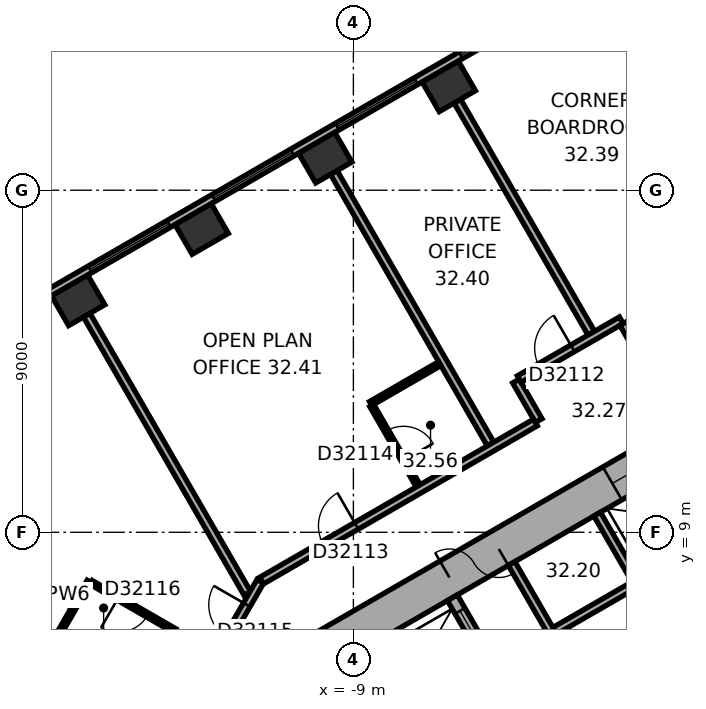
"""IFC4 building model, lengths in metres.
Left out: names, types, materials, properties, quantities, classifications, styles, units other than length and angle.
Written with IfcOpenShell. Run it as: python <this file> out.ifc"""

import sys

from ifc_helpers import new_model, si_unit, direction, frame, frame_2d, origin, origin_2d, place, context, subcontext, project, spatial, rectangle, extrude, element, fill, save


model = new_model("IFC4")
c1 = context("Model", 3, precision=1e-05, world=origin(), true_north=direction((0.0, 1.0)))
c2 = subcontext(c1, "Body", "Model", "MODEL_VIEW")
j1 = project(units=[si_unit("LENGTHUNIT", "METRE"), si_unit("PLANEANGLEUNIT", "RADIAN")], contexts=[c1])
p1 = place(None, origin())
s1 = spatial("IfcSite", under=j1, at=p1, CompositionType="ELEMENT")
p2 = place(p1, origin())
s2 = spatial("IfcBuilding", under=s1, at=p2, CompositionType="ELEMENT")
p3 = place(p2, frame((0.0, 0.0, 131.8)))
s3 = spatial("IfcBuildingStorey", under=s2, at=p3, CompositionType="ELEMENT", Elevation=131.8)
for number, where, z_axis, x_axis in (
    (1, (-6.489, 20.733, 0.0), (0.0, 0.0, 1.0), (-0.866, -0.5, 0.0)),
    (2, (-9.74, 18.856, 0.0), (0.0, 0.0, 1.0), (-0.866, -0.5, 0.0)),
    (3, (-12.991, 16.979, 0.0), (0.0, 0.0, 1.0), (-0.866, -0.5, 0.0)),
    (4, (-16.242, 15.102, 0.0), (0.0, 0.0, 1.0), (-0.866, -0.5, 0.0)),
):
    element("IfcColumn", number, at=place(p3, frame(where, z_axis=z_axis, x_axis=x_axis)), inside=s3, PredefinedType="COLUMN", context=c2, shape_type="SweptSolid", body=[
        extrude(rectangle(XDim=1.1, YDim=0.9, at=origin_2d()), origin(), (0.0, 0.0, 1.0), 3.7),
    ])
p4 = place(p3, frame((0.25, 11.691, 0.0), z_axis=(0.0, 0.0, 1.0), x_axis=(-0.866022616891, -0.50000482701, 0.0)))
e5 = element("IfcWall", 5, at=p4, inside=s3, PredefinedType="SHEAR", context=c2, shape_type="SweptSolid", body=[
    extrude(rectangle(XDim=12.125, YDim=1.0, at=frame_2d((6.062, 0.0))), origin(), (0.0, 0.0, 1.0), 3.7),
])
p5 = place(p4, frame((6.262, 0.0, 0.0)))
e6 = element("IfcOpeningElement", 6, at=p5, cuts=e5, PredefinedType="OPENING", context=c2, shape_type="SweptSolid", body=[
    extrude(rectangle(XDim=1.5, YDim=2.1, at=frame_2d((0.75, 1.05))), frame((0.0, 0.51, 0.0), z_axis=(0.0, -1.0, 0.0), x_axis=(1.0, 0.0, 0.0)), (0.0, 0.0, 1.0), 1.02),
])
p6 = place(p4, frame((1.712, 0.0, 0.0)))
e7 = element("IfcOpeningElement", 7, at=p6, cuts=e5, PredefinedType="OPENING", context=c2, shape_type="SweptSolid", body=[
    extrude(rectangle(XDim=1.1, YDim=2.1, at=frame_2d((0.55, 1.05))), frame((0.0, 0.51, 0.0), z_axis=(0.0, -1.0, 0.0), x_axis=(1.0, 0.0, 0.0)), (0.0, 0.0, 1.0), 1.02),
])
p7 = place(p3, frame((-2.961, 23.405, 0.0), z_axis=(0.0, 0.0, 1.0), x_axis=(-0.866023315909, -0.500003616288, 0.0)))
e8 = element("IfcWall", 8, at=p7, inside=s3, PredefinedType="STANDARD", context=c2, shape_type="SweptSolid", body=[
    extrude(rectangle(XDim=20.044, YDim=0.2, at=frame_2d((10.022, 0.0))), origin(), (0.0, 0.0, 1.0), 3.7),
])
p8 = place(p7, frame((1.314, 0.0, 0.9)))
e9 = element("IfcOpeningElement", 9, at=p8, cuts=e8, PredefinedType="OPENING", context=c2, shape_type="SweptSolid", body=[
    extrude(rectangle(XDim=2.4, YDim=2.0, at=frame_2d((1.2, 1.0))), frame((0.0, 0.11, 0.0), z_axis=(0.0, -1.0, 0.0), x_axis=(1.0, 0.0, 0.0)), (0.0, 0.0, 1.0), 0.22),
])
p9 = place(p7, frame((5.069, 0.0, 0.9)))
e10 = element("IfcOpeningElement", 10, at=p9, cuts=e8, PredefinedType="OPENING", context=c2, shape_type="SweptSolid", body=[
    extrude(rectangle(XDim=2.4, YDim=2.0, at=frame_2d((1.2, 1.0))), frame((0.0, 0.11, 0.0), z_axis=(0.0, -1.0, 0.0), x_axis=(1.0, 0.0, 0.0)), (0.0, 0.0, 1.0), 0.22),
])
p10 = place(p7, frame((8.823, 0.0, 0.9)))
e11 = element("IfcOpeningElement", 11, at=p10, cuts=e8, PredefinedType="OPENING", context=c2, shape_type="SweptSolid", body=[
    extrude(rectangle(XDim=2.4, YDim=2.0, at=frame_2d((1.2, 1.0))), frame((0.0, 0.11, 0.0), z_axis=(0.0, -1.0, 0.0), x_axis=(1.0, 0.0, 0.0)), (0.0, 0.0, 1.0), 0.22),
])
p11 = place(p7, frame((12.577, 0.0, 0.9)))
e12 = element("IfcOpeningElement", 12, at=p11, cuts=e8, PredefinedType="OPENING", context=c2, shape_type="SweptSolid", body=[
    extrude(rectangle(XDim=2.4, YDim=2.0, at=frame_2d((1.2, 1.0))), frame((0.0, 0.11, 0.0), z_axis=(0.0, -1.0, 0.0), x_axis=(1.0, 0.0, 0.0)), (0.0, 0.0, 1.0), 0.22),
])
p12 = place(p7, frame((16.331, 0.0, 0.9)))
e13 = element("IfcOpeningElement", 13, at=p12, cuts=e8, PredefinedType="OPENING", context=c2, shape_type="SweptSolid", body=[
    extrude(rectangle(XDim=2.4, YDim=2.0, at=frame_2d((1.2, 1.0))), frame((0.0, 0.11, 0.0), z_axis=(0.0, -1.0, 0.0), x_axis=(1.0, 0.0, 0.0)), (0.0, 0.0, 1.0), 0.22),
])
p13 = place(p3, frame((0.803, 9.009, 0.0), z_axis=(0.0, 0.0, 1.0), x_axis=(-0.866028230842, -0.499995103361, 0.0)))
e14 = element("IfcWall", 14, at=p13, inside=s3, PredefinedType="PARTITIONING", context=c2, shape_type="SweptSolid", body=[
    extrude(rectangle(XDim=5.4, YDim=0.2, at=frame_2d((2.7, 0.0))), origin(), (0.0, 0.0, 1.0), 3.42),
])
for number, where, z_axis, x_axis in (
    (15, (-1.485, 7.572, 0.0), (0.0, 0.0, 1.0), (-0.5, 0.866, 0.0)),
    (16, (-3.737, 6.272, 0.0), (0.0, 0.0, 1.0), (-0.5, 0.866, 0.0)),
):
    element("IfcWall", number, at=place(p3, frame(where, z_axis=z_axis, x_axis=x_axis)), inside=s3, PredefinedType="PARTITIONING", context=c2, shape_type="SweptSolid", body=[
        extrude(rectangle(XDim=2.2, YDim=0.2, at=frame_2d((1.1, 0.0))), origin(), (0.0, 0.0, 1.0), 3.42),
    ])
p14 = place(p3, frame((-2.216, 4.282, 0.0), z_axis=(0.0, 0.0, 1.0), x_axis=(0.499977259774, 0.866038532462, 0.0)))
e17 = element("IfcWall", 17, at=p14, inside=s3, PredefinedType="SHEAR", context=c2, shape_type="SweptSolid", body=[
    extrude(rectangle(XDim=4.7, YDim=0.3, at=frame_2d((2.35, 0.0))), origin(), (0.0, 0.0, 1.0), 3.42),
])
p15 = place(p3, frame((-5.295, 5.372, 0.0), z_axis=(0.0, 0.0, 1.0), x_axis=(-0.500077893725, 0.86598042715, 0.0)))
e18 = element("IfcWall", 18, at=p15, inside=s3, PredefinedType="SHEAR", context=c2, shape_type="SweptSolid", body=[
    extrude(rectangle(XDim=2.2, YDim=0.3, at=frame_2d((1.1, 0.0))), origin(), (0.0, 0.0, 1.0), 3.42),
])
p16 = place(p15, frame((0.7, 0.0, 0.0)))
e19 = element("IfcOpeningElement", 19, at=p16, cuts=e18, PredefinedType="OPENING", context=c2, shape_type="SweptSolid", body=[
    extrude(rectangle(XDim=1.1, YDim=2.1, at=frame_2d((0.55, 1.05))), frame((0.0, 0.16, 0.0), z_axis=(0.0, -1.0, 0.0), x_axis=(1.0, 0.0, 0.0)), (0.0, 0.0, 1.0), 0.32),
])
p17 = place(p3, frame((-17.052, 5.804, 0.0), z_axis=(0.0, 0.0, 1.0), x_axis=(0.50002983664, 0.866008176907, 0.0)))
e20 = element("IfcWall", 20, at=p17, inside=s3, PredefinedType="PARTITIONING", context=c2, shape_type="SweptSolid", body=[
    extrude(rectangle(XDim=2.2, YDim=0.12, at=frame_2d((1.1, 0.0))), origin(), (0.0, 0.0, 1.0), 3.42),
])
p18 = place(p3, frame((-16.018, 14.712, 0.0), z_axis=(0.0, 0.0, 1.0), x_axis=(0.500000843414, -0.866024916838, 0.0)))
e21 = element("IfcWall", 21, at=p18, inside=s3, PredefinedType="PARTITIONING", context=c2, shape_type="SweptSolid", body=[
    extrude(rectangle(XDim=8.452, YDim=0.2, at=frame_2d((4.226, 0.0))), origin(), (0.0, 0.0, 1.0), 3.42),
])
p19 = place(p3, frame((-15.9, 7.679, 0.0), z_axis=(0.0, 0.0, 1.0), x_axis=(0.866022320763, -0.500005339912, 0.0)))
e22 = element("IfcWall", 22, at=p19, inside=s3, PredefinedType="PARTITIONING", context=c2, shape_type="SweptSolid", body=[
    extrude(rectangle(XDim=2.54, YDim=0.12, at=frame_2d((1.27, 0.0))), origin(), (0.0, 0.0, 1.0), 3.42),
])
p20 = place(p19, frame((0.82, 0.0, 0.0)))
e23 = element("IfcOpeningElement", 23, at=p20, cuts=e22, PredefinedType="OPENING", context=c2, shape_type="SweptSolid", body=[
    extrude(rectangle(XDim=0.9, YDim=2.1, at=frame_2d((0.45, 1.05))), frame((0.0, 0.07, 0.0), z_axis=(0.0, -1.0, 0.0), x_axis=(1.0, 0.0, 0.0)), (0.0, 0.0, 1.0), 0.14),
])
p21 = place(p3, frame((-11.45, 7.708, 0.0), z_axis=(0.0, 0.0, 1.0), x_axis=(-0.500022797313, -0.86601224135, 0.0)))
e24 = element("IfcWall", 24, at=p21, inside=s3, PredefinedType="PARTITIONING", context=c2, shape_type="SweptSolid", body=[
    extrude(rectangle(XDim=1.9, YDim=0.2, at=frame_2d((0.95, 0.0))), origin(), (0.0, 0.0, 1.0), 3.42),
])
p22 = place(p21, frame((0.712, 0.0, 0.0)))
e25 = element("IfcOpeningElement", 25, at=p22, cuts=e24, PredefinedType="OPENING", context=c2, shape_type="SweptSolid", body=[
    extrude(rectangle(XDim=1.0, YDim=2.1, at=frame_2d((0.5, 1.05))), frame((0.0, 0.11, 0.0), z_axis=(0.0, -1.0, 0.0), x_axis=(1.0, 0.0, 0.0)), (0.0, 0.0, 1.0), 0.22),
])
p23 = place(p3, frame((-9.515, 18.466, 0.0), z_axis=(0.0, 0.0, 1.0), x_axis=(0.500009360108, -0.866019999656, 0.0)))
e26 = element("IfcWall", 26, at=p23, inside=s3, PredefinedType="PARTITIONING", context=c2, shape_type="SweptSolid", body=[
    extrude(rectangle(XDim=8.25, YDim=0.2, at=frame_2d((4.125, 0.0))), origin(), (0.0, 0.0, 1.0), 2.87),
])
p24 = place(p3, frame((-8.545, 12.387, 0.0), z_axis=(0.0, 0.0, 1.0), x_axis=(0.866009402589, 0.500027713859, 0.0)))
e27 = element("IfcWall", 27, at=p24, inside=s3, PredefinedType="PARTITIONING", context=c2, shape_type="SweptSolid", body=[
    extrude(rectangle(XDim=2.1, YDim=0.12, at=frame_2d((1.05, 0.0))), origin(), (0.0, 0.0, 1.0), 3.42),
])
p25 = place(p3, frame((-7.295, 10.222, 0.0), z_axis=(0.0, 0.0, 1.0), x_axis=(-0.500002508028, 0.866023955769, 0.0)))
e28 = element("IfcWall", 28, at=p25, inside=s3, PredefinedType="PARTITIONING", context=c2, shape_type="SweptSolid", body=[
    extrude(rectangle(XDim=2.44, YDim=0.12, at=frame_2d((1.22, 0.0))), origin(), (0.0, 0.0, 1.0), 3.42),
])
p26 = place(p25, frame((0.77, 0.0, 0.0)))
e29 = element("IfcOpeningElement", 29, at=p26, cuts=e28, PredefinedType="OPENING", context=c2, shape_type="SweptSolid", body=[
    extrude(rectangle(XDim=0.9, YDim=2.1, at=frame_2d((0.45, 1.05))), frame((0.0, 0.07, 0.0), z_axis=(0.0, -1.0, 0.0), x_axis=(1.0, 0.0, 0.0)), (0.0, 0.0, 1.0), 0.14),
])
p27 = place(p3, frame((-6.264, 20.344, 0.0), z_axis=(0.0, 0.0, 1.0), x_axis=(0.500009260695, -0.866020057054, 0.0)))
e30 = element("IfcWall", 30, at=p27, inside=s3, PredefinedType="PARTITIONING", context=c2, shape_type="SweptSolid", body=[
    extrude(rectangle(XDim=7.049, YDim=0.2, at=frame_2d((3.524, 0.0))), origin(), (0.0, 0.0, 1.0), 3.42),
])
p28 = place(p3, frame((-4.723, 12.978, 0.0), z_axis=(0.0, 0.0, 1.0), x_axis=(0.500074377092, -0.865982457891, 0.0)))
e31 = element("IfcWall", 31, at=p28, inside=s3, PredefinedType="PARTITIONING", context=c2, shape_type="SweptSolid", body=[
    extrude(rectangle(XDim=1.201, YDim=0.2, at=frame_2d((0.601, 0.0))), origin(), (0.0, 0.0, 1.0), 3.42),
])
p29 = place(p3, frame((-4.209, 11.888, 0.0), z_axis=(0.0, 0.0, 1.0), x_axis=(-0.866020930448, -0.500007747966, 0.0)))
e32 = element("IfcWall", 32, at=p29, inside=s3, PredefinedType="PARTITIONING", context=c2, shape_type="SweptSolid", body=[
    extrude(rectangle(XDim=8.321, YDim=0.2, at=frame_2d((4.161, 0.0))), origin(), (0.0, 0.0, 1.0), 3.42),
])
p30 = place(p29, frame((5.439, 0.0, 0.0)))
e33 = element("IfcOpeningElement", 33, at=p30, cuts=e32, PredefinedType="OPENING", context=c2, shape_type="SweptSolid", body=[
    extrude(rectangle(XDim=1.0, YDim=2.1, at=frame_2d((0.5, 1.05))), frame((0.0, 0.11, 0.0), z_axis=(0.0, -1.0, 0.0), x_axis=(1.0, 0.0, 0.0)), (0.0, 0.0, 1.0), 0.22),
])
p31 = place(p3, frame((-1.95, 14.579, 0.0), z_axis=(0.0, 0.0, 1.0), x_axis=(-0.866011260204, -0.500024496599, 0.0)))
e34 = element("IfcWall", 34, at=p31, inside=s3, PredefinedType="PARTITIONING", context=c2, shape_type="SweptSolid", body=[
    extrude(rectangle(XDim=3.102, YDim=0.2, at=frame_2d((1.551, 0.0))), origin(), (0.0, 0.0, 1.0), 3.42),
])
p32 = place(p31, frame((1.478, 0.0, 0.0)))
e35 = element("IfcOpeningElement", 35, at=p32, cuts=e34, PredefinedType="OPENING", context=c2, shape_type="SweptSolid", body=[
    extrude(rectangle(XDim=1.0, YDim=2.1, at=frame_2d((0.5, 1.05))), frame((0.0, 0.11, 0.0), z_axis=(0.0, -1.0, 0.0), x_axis=(1.0, 0.0, 0.0)), (0.0, 0.0, 1.0), 0.22),
])
p33 = place(p3, frame((-1.349, 13.539, 0.0), z_axis=(0.0, 0.0, 1.0), x_axis=(-0.500074377092, 0.865982457891, 0.0)))
e36 = element("IfcWall", 36, at=p33, inside=s3, PredefinedType="PARTITIONING", context=c2, shape_type="SweptSolid", body=[
    extrude(rectangle(XDim=1.101, YDim=0.2, at=frame_2d((0.55, 0.0))), origin(), (0.0, 0.0, 1.0), 3.42),
])
p34 = place(p8, origin())
e37 = element("IfcWindow", 37, at=p34, inside=s3, PartitioningType="SINGLE_PANEL", PredefinedType="WINDOW", context=c2, shape_type="SweptSolid", body=[
    extrude(rectangle(XDim=2.4, YDim=2.0, at=frame_2d((1.2, 1.0))), frame((0.0, 0.03, 0.0), z_axis=(0.0, -1.0, 0.0), x_axis=(1.0, 0.0, 0.0)), (0.0, 0.0, 1.0), 0.06),
])
fill(e9, e37)
p35 = place(p9, origin())
e38 = element("IfcWindow", 38, at=p35, inside=s3, PartitioningType="SINGLE_PANEL", PredefinedType="WINDOW", context=c2, shape_type="SweptSolid", body=[
    extrude(rectangle(XDim=2.4, YDim=2.0, at=frame_2d((1.2, 1.0))), frame((0.0, 0.03, 0.0), z_axis=(0.0, -1.0, 0.0), x_axis=(1.0, 0.0, 0.0)), (0.0, 0.0, 1.0), 0.06),
])
fill(e10, e38)
p36 = place(p10, origin())
e39 = element("IfcWindow", 39, at=p36, inside=s3, PartitioningType="SINGLE_PANEL", PredefinedType="WINDOW", context=c2, shape_type="SweptSolid", body=[
    extrude(rectangle(XDim=2.4, YDim=2.0, at=frame_2d((1.2, 1.0))), frame((0.0, 0.03, 0.0), z_axis=(0.0, -1.0, 0.0), x_axis=(1.0, 0.0, 0.0)), (0.0, 0.0, 1.0), 0.06),
])
fill(e11, e39)
p37 = place(p11, origin())
e40 = element("IfcWindow", 40, at=p37, inside=s3, PartitioningType="SINGLE_PANEL", PredefinedType="WINDOW", context=c2, shape_type="SweptSolid", body=[
    extrude(rectangle(XDim=2.4, YDim=2.0, at=frame_2d((1.2, 1.0))), frame((0.0, 0.03, 0.0), z_axis=(0.0, -1.0, 0.0), x_axis=(1.0, 0.0, 0.0)), (0.0, 0.0, 1.0), 0.06),
])
fill(e12, e40)
p38 = place(p5, origin())
e41 = element("IfcDoor", 41, at=p38, inside=s3, OperationType="DOUBLE_DOOR_SINGLE_SWING", PredefinedType="DOOR", context=c2, shape_type="SweptSolid", body=[
    extrude(rectangle(XDim=1.5, YDim=2.1, at=frame_2d((0.75, 1.05))), frame((0.0, 0.025, 0.0), z_axis=(0.0, -1.0, 0.0), x_axis=(1.0, 0.0, 0.0)), (0.0, 0.0, 1.0), 0.05),
])
fill(e6, e41)
p39 = place(p16, origin())
e42 = element("IfcDoor", 42, at=p39, inside=s3, OperationType="DOUBLE_DOOR_SLIDING", PredefinedType="DOOR", context=c2, shape_type="SweptSolid", body=[
    extrude(rectangle(XDim=1.1, YDim=2.1, at=frame_2d((0.55, 1.05))), frame((0.0, 0.025, 0.0), z_axis=(0.0, -1.0, 0.0), x_axis=(1.0, 0.0, 0.0)), (0.0, 0.0, 1.0), 0.05),
])
fill(e19, e42)
p40 = place(p6, origin())
e43 = element("IfcDoor", 43, at=p40, inside=s3, OperationType="DOUBLE_DOOR_SLIDING", PredefinedType="DOOR", context=c2, shape_type="SweptSolid", body=[
    extrude(rectangle(XDim=1.1, YDim=2.1, at=frame_2d((0.55, 1.05))), frame((0.0, 0.025, 0.0), z_axis=(0.0, -1.0, 0.0), x_axis=(1.0, 0.0, 0.0)), (0.0, 0.0, 1.0), 0.05),
])
fill(e7, e43)
p41 = place(p32, origin())
e44 = element("IfcDoor", 44, at=p41, inside=s3, OperationType="SINGLE_SWING_LEFT", PredefinedType="DOOR", context=c2, shape_type="SweptSolid", body=[
    extrude(rectangle(XDim=1.0, YDim=2.1, at=frame_2d((0.5, 1.05))), frame((0.0, 0.025, 0.0), z_axis=(0.0, -1.0, 0.0), x_axis=(1.0, 0.0, 0.0)), (0.0, 0.0, 1.0), 0.05),
])
fill(e35, e44)
p42 = place(p30, origin())
e45 = element("IfcDoor", 45, at=p42, inside=s3, OperationType="SINGLE_SWING_LEFT", PredefinedType="DOOR", context=c2, shape_type="SweptSolid", body=[
    extrude(rectangle(XDim=1.0, YDim=2.1, at=frame_2d((0.5, 1.05))), frame((0.0, 0.025, 0.0), z_axis=(0.0, -1.0, 0.0), x_axis=(1.0, 0.0, 0.0)), (0.0, 0.0, 1.0), 0.05),
])
fill(e33, e45)
p43 = place(p26, origin())
e46 = element("IfcDoor", 46, at=p43, inside=s3, OperationType="SINGLE_SWING_LEFT", PredefinedType="DOOR", context=c2, shape_type="SweptSolid", body=[
    extrude(rectangle(XDim=0.9, YDim=2.1, at=frame_2d((0.45, 1.05))), frame((0.0, 0.025, 0.0), z_axis=(0.0, -1.0, 0.0), x_axis=(1.0, 0.0, 0.0)), (0.0, 0.0, 1.0), 0.05),
])
fill(e29, e46)
p44 = place(p22, origin())
e47 = element("IfcDoor", 47, at=p44, inside=s3, OperationType="SINGLE_SWING_LEFT", PredefinedType="DOOR", context=c2, shape_type="SweptSolid", body=[
    extrude(rectangle(XDim=1.0, YDim=2.1, at=frame_2d((0.5, 1.05))), frame((0.0, 0.025, 0.0), z_axis=(0.0, -1.0, 0.0), x_axis=(1.0, 0.0, 0.0)), (0.0, 0.0, 1.0), 0.05),
])
fill(e25, e47)
p45 = place(p20, origin())
e48 = element("IfcDoor", 48, at=p45, inside=s3, OperationType="SINGLE_SWING_LEFT", PredefinedType="DOOR", context=c2, shape_type="SweptSolid", body=[
    extrude(rectangle(XDim=0.9, YDim=2.1, at=frame_2d((0.45, 1.05))), frame((0.0, 0.025, 0.0), z_axis=(0.0, -1.0, 0.0), x_axis=(1.0, 0.0, 0.0)), (0.0, 0.0, 1.0), 0.05),
])
fill(e23, e48)
save(model, sys.argv[1])
